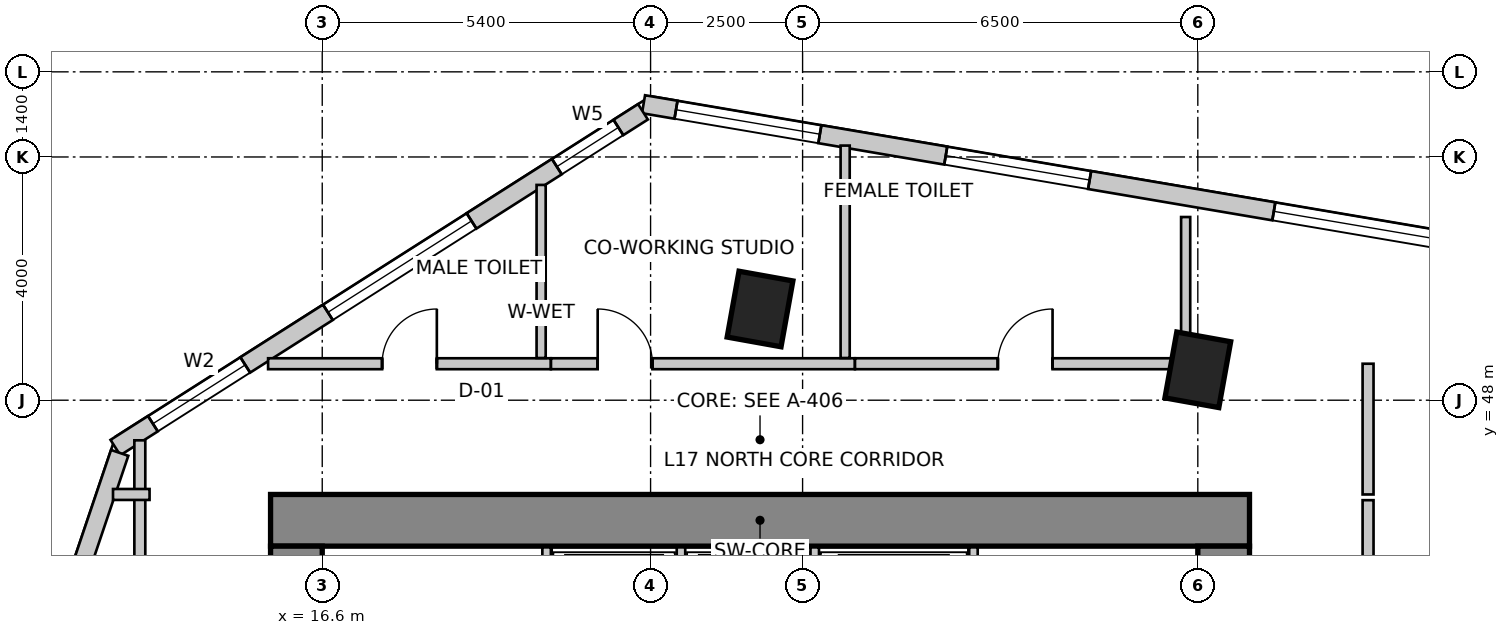
"""IFC4 building model, lengths in metres.
Left out: names, types, materials, properties, quantities, classifications, styles, units other than length and angle.
Written with IfcOpenShell. Run it as: python <this file> out.ifc"""

import sys

from ifc_helpers import new_model, si_unit, direction, frame, frame_2d, origin, origin_2d, place, context, subcontext, project, spatial, rectangle, extrude, source, transform, mapped, element, fill, save


model = new_model("IFC4")
c1 = context("Model", 3, precision=1e-05, world=origin(), true_north=direction((0.0, 1.0)))
c2 = subcontext(c1, "Body", "Model", "MODEL_VIEW")
j1 = project(units=[si_unit("LENGTHUNIT", "METRE"), si_unit("PLANEANGLEUNIT", "RADIAN")], contexts=[c1])
p1 = place(None, origin())
s1 = spatial("IfcSite", under=j1, at=p1, CompositionType="ELEMENT")
p2 = place(p1, origin())
s2 = spatial("IfcBuilding", under=s1, at=p2, CompositionType="ELEMENT")
p3 = place(p2, frame((0.0, 0.0, 71.0)))
s3 = spatial("IfcBuildingStorey", under=s2, at=p3, CompositionType="ELEMENT", Elevation=71.0)
p4 = place(p3, frame((15.75, 46.025, 0.0), z_axis=(0.0, 0.0, 1.0), x_axis=(1.0, 0.0, 0.0)))
e1 = element("IfcWall", 1, at=p4, inside=s3, PredefinedType="SHEAR", context=c2, shape_type="SweptSolid", body=[
    extrude(rectangle(XDim=16.1, YDim=0.85, at=frame_2d((8.05, 0.0))), origin(), (0.0, 0.0, 1.0), 4.0),
])
p5 = place(p3, frame((16.175, 34.2, 0.0), z_axis=(0.0, 0.0, 1.0), x_axis=(0.0, 1.0, 0.0)))
e2 = element("IfcWall", 2, at=p5, inside=s3, PredefinedType="SHEAR", context=c2, shape_type="SweptSolid", body=[
    extrude(rectangle(XDim=11.4, YDim=0.85, at=frame_2d((5.7, 0.0))), origin(), (0.0, 0.0, 1.0), 4.0),
])
m1 = source(origin(), c2, "Body", "SweptSolid", [
    extrude(rectangle(XDim=1.1, YDim=2.15, at=frame_2d((0.55, 1.075))), frame((0.0, 0.435, 0.0), z_axis=(0.0, -1.0, 0.0), x_axis=(1.0, 0.0, 0.0)), (0.0, 0.0, 1.0), 0.87),
])
p6 = place(p5, frame((7.15, 0.0, 0.0)))
e3 = element("IfcOpeningElement", 3, at=p6, cuts=e2, PredefinedType="OPENING", context=c2, shape_type="MappedRepresentation", body=[
    mapped(m1, transform((0.0, 0.0, 0.0), scale=1.0)),
])
p7 = place(p3, frame((31.425, 34.2, 0.0), z_axis=(0.0, 0.0, 1.0), x_axis=(0.0, 1.0, 0.0)))
e4 = element("IfcWall", 4, at=p7, inside=s3, PredefinedType="SHEAR", context=c2, shape_type="SweptSolid", body=[
    extrude(rectangle(XDim=11.4, YDim=0.85, at=frame_2d((5.7, 0.0))), origin(), (0.0, 0.0, 1.0), 4.0),
])
p8 = place(p7, frame((7.35, 0.0, 0.0)))
e5 = element("IfcOpeningElement", 5, at=p8, cuts=e4, PredefinedType="OPENING", context=c2, shape_type="MappedRepresentation", body=[
    mapped(m1, transform((0.0, 0.0, 0.0), scale=1.0)),
])
m2 = source(origin(), c2, "Body", "SweptSolid", [
    extrude(rectangle(XDim=0.9, YDim=1.1, at=origin_2d()), origin(), (0.0, 0.0, 1.0), 4.0),
])
for number, where, z_axis, x_axis in (
    (6, (23.8, 49.5, 0.0), (0.0, 0.0, 1.0), (0.984, -0.177, 0.0)),
    (7, (31.0, 48.5, 0.0), (0.0, 0.0, 1.0), (0.984, -0.177, 0.0)),
):
    element("IfcColumn", number, at=place(p3, frame(where, z_axis=z_axis, x_axis=x_axis)), inside=s3, PredefinedType="COLUMN", context=c2, shape_type="MappedRepresentation", body=[
        mapped(m2, transform((0.0, 0.0, 0.0), scale=1.0)),
    ])
p9 = place(p3, frame((53.961, 47.417, 0.0), z_axis=(0.0, 0.0, 1.0), x_axis=(-0.985865713455, 0.167537443678, 0.0)))
e8 = element("IfcWall", 8, at=p9, inside=s3, PredefinedType="SOLIDWALL", context=c2, shape_type="SweptSolid", body=[
    extrude(rectangle(XDim=32.537, YDim=0.3, at=frame_2d((16.269, 0.0))), origin(), (0.0, 0.0, 1.0), 3.75),
])
m3 = source(origin(), c2, "Body", "SweptSolid", [
    extrude(rectangle(XDim=2.1, YDim=2.0, at=frame_2d((1.05, 1.0))), frame((0.0, 0.16, 0.0), z_axis=(0.0, -1.0, 0.0), x_axis=(1.0, 0.0, 0.0)), (0.0, 0.0, 1.0), 0.32),
])
p10 = place(p9, frame((0.626, 0.0, 0.85)))
e9 = element("IfcOpeningElement", 9, at=p10, cuts=e8, PredefinedType="OPENING", context=c2, shape_type="MappedRepresentation", body=[
    mapped(m3, transform((0.0, 0.0, 0.0), scale=1.0)),
])
m4 = source(origin(), c2, "Body", "SweptSolid", [
    extrude(rectangle(XDim=2.4, YDim=2.2, at=frame_2d((1.2, 1.1))), frame((0.0, 0.16, 0.0), z_axis=(0.0, -1.0, 0.0), x_axis=(1.0, 0.0, 0.0)), (0.0, 0.0, 1.0), 0.32),
])
p11 = place(p9, frame((4.504, 0.0, 0.85)))
e10 = element("IfcOpeningElement", 10, at=p11, cuts=e8, PredefinedType="OPENING", context=c2, shape_type="MappedRepresentation", body=[
    mapped(m4, transform((0.0, 0.0, 0.0), scale=1.0)),
])
m5 = source(origin(), c2, "Body", "SweptSolid", [
    extrude(rectangle(XDim=2.8, YDim=2.4, at=frame_2d((1.4, 1.2))), frame((0.0, 0.16, 0.0), z_axis=(0.0, -1.0, 0.0), x_axis=(1.0, 0.0, 0.0)), (0.0, 0.0, 1.0), 0.32),
])
p12 = place(p9, frame((8.768, 0.0, 0.85)))
e11 = element("IfcOpeningElement", 11, at=p12, cuts=e8, PredefinedType="OPENING", context=c2, shape_type="MappedRepresentation", body=[
    mapped(m5, transform((0.0, 0.0, 0.0), scale=1.0)),
])
p13 = place(p9, frame((14.234, 0.0, 0.85)))
e12 = element("IfcOpeningElement", 12, at=p13, cuts=e8, PredefinedType="OPENING", context=c2, shape_type="MappedRepresentation", body=[
    mapped(m4, transform((0.0, 0.0, 0.0), scale=1.0)),
])
p14 = place(p9, frame((19.222, 0.0, 0.85)))
e13 = element("IfcOpeningElement", 13, at=p14, cuts=e8, PredefinedType="OPENING", context=c2, shape_type="MappedRepresentation", body=[
    mapped(m5, transform((0.0, 0.0, 0.0), scale=1.0)),
])
p15 = place(p9, frame((25.095, 0.0, 0.85)))
e14 = element("IfcOpeningElement", 14, at=p15, cuts=e8, PredefinedType="OPENING", context=c2, shape_type="MappedRepresentation", body=[
    mapped(m4, transform((0.0, 0.0, 0.0), scale=1.0)),
])
p16 = place(p9, frame((29.595, 0.0, 0.85)))
e15 = element("IfcOpeningElement", 15, at=p16, cuts=e8, PredefinedType="OPENING", context=c2, shape_type="MappedRepresentation", body=[
    mapped(m4, transform((0.0, 0.0, 0.0), scale=1.0)),
])
p17 = place(p3, frame((21.875, 52.742, 0.0), z_axis=(0.0, 0.0, 1.0), x_axis=(-0.843662465249, -0.536873956092, 0.0)))
e16 = element("IfcWall", 16, at=p17, inside=s3, PredefinedType="SOLIDWALL", context=c2, shape_type="SweptSolid", body=[
    extrude(rectangle(XDim=10.284, YDim=0.3, at=frame_2d((5.142, 0.0))), origin(), (0.0, 0.0, 1.0), 3.75),
])
m6 = source(origin(), c2, "Body", "SweptSolid", [
    extrude(rectangle(XDim=1.2, YDim=1.6, at=frame_2d((0.6, 0.8))), frame((0.0, 0.16, 0.0), z_axis=(0.0, -1.0, 0.0), x_axis=(1.0, 0.0, 0.0)), (0.0, 0.0, 1.0), 0.32),
])
p18 = place(p17, frame((0.479, 0.0, 0.85)))
e17 = element("IfcOpeningElement", 17, at=p18, cuts=e16, PredefinedType="OPENING", context=c2, shape_type="MappedRepresentation", body=[
    mapped(m6, transform((0.0, 0.0, 0.0), scale=1.0)),
])
p19 = place(p17, frame((3.342, 0.0, 0.85)))
e18 = element("IfcOpeningElement", 18, at=p19, cuts=e16, PredefinedType="OPENING", context=c2, shape_type="MappedRepresentation", body=[
    mapped(m5, transform((0.0, 0.0, 0.0), scale=1.0)),
])
m7 = source(origin(), c2, "Body", "SweptSolid", [
    extrude(rectangle(XDim=1.8, YDim=2.1, at=frame_2d((0.9, 1.05))), frame((0.0, 0.16, 0.0), z_axis=(0.0, -1.0, 0.0), x_axis=(1.0, 0.0, 0.0)), (0.0, 0.0, 1.0), 0.32),
])
p20 = place(p17, frame((7.753, 0.0, 0.85)))
e19 = element("IfcOpeningElement", 19, at=p20, cuts=e16, PredefinedType="OPENING", context=c2, shape_type="MappedRepresentation", body=[
    mapped(m7, transform((0.0, 0.0, 0.0), scale=1.0)),
])
p21 = place(p3, frame((13.269, 47.134, 0.0), z_axis=(0.0, 0.0, 1.0), x_axis=(-0.319920423265, -0.947444416722, 0.0)))
e20 = element("IfcWall", 20, at=p21, inside=s3, PredefinedType="SOLIDWALL", context=c2, shape_type="SweptSolid", body=[
    extrude(rectangle(XDim=16.135, YDim=0.3, at=frame_2d((8.067, 0.0))), origin(), (0.0, 0.0, 1.0), 3.75),
])
p22 = place(p21, frame((2.188, 0.0, 0.85)))
e21 = element("IfcOpeningElement", 21, at=p22, cuts=e20, PredefinedType="OPENING", context=c2, shape_type="MappedRepresentation", body=[
    mapped(m4, transform((0.0, 0.0, 0.0), scale=1.0)),
])
p23 = place(p21, frame((6.959, 0.0, 0.85)))
e22 = element("IfcOpeningElement", 22, at=p23, cuts=e20, PredefinedType="OPENING", context=c2, shape_type="MappedRepresentation", body=[
    mapped(m5, transform((0.0, 0.0, 0.0), scale=1.0)),
])
p24 = place(p21, frame((12.13, 0.0, 0.85)))
e23 = element("IfcOpeningElement", 23, at=p24, cuts=e20, PredefinedType="OPENING", context=c2, shape_type="MappedRepresentation", body=[
    mapped(m4, transform((0.0, 0.0, 0.0), scale=1.0)),
])
for number, where, z_axis, x_axis in (
    (24, (20.29, 43.28, 0.0), (0.0, 0.0, 1.0), (0.0, 1.0, 0.0)),
    (25, (27.31, 43.28, 0.0), (0.0, 0.0, 1.0), (0.0, 1.0, 0.0)),
):
    element("IfcWall", number, at=place(p3, frame(where, z_axis=z_axis, x_axis=x_axis)), inside=s3, PredefinedType="SOLIDWALL", context=c2, shape_type="SweptSolid", body=[
        extrude(rectangle(XDim=2.3, YDim=0.14, at=frame_2d((1.15, 0.0))), origin(), (0.0, 0.0, 1.0), 3.75),
    ])
for number, where, z_axis, x_axis in (
    (26, (22.5, 43.02, 0.0), (0.0, 0.0, 1.0), (0.0, 1.0, 0.0)),
    (27, (24.7, 43.02, 0.0), (0.0, 0.0, 1.0), (0.0, 1.0, 0.0)),
):
    element("IfcWall", number, at=place(p3, frame(where, z_axis=z_axis, x_axis=x_axis)), inside=s3, PredefinedType="SOLIDWALL", context=c2, shape_type="SweptSolid", body=[
        extrude(rectangle(XDim=2.56, YDim=0.14, at=frame_2d((1.28, 0.0))), origin(), (0.0, 0.0, 1.0), 3.75),
    ])
p25 = place(p3, frame((13.6, 33.444, 0.0), z_axis=(0.0, 0.0, 1.0), x_axis=(0.0, 1.0, 0.0)))
e28 = element("IfcWall", 28, at=p25, inside=s3, PredefinedType="PARTITIONING", context=c2, shape_type="SweptSolid", body=[
    extrude(rectangle(XDim=13.896, YDim=0.18, at=frame_2d((6.948, 0.0))), origin(), (0.0, 0.0, 1.0), 2.892),
])
m8 = source(origin(), c2, "Body", "SweptSolid", [
    extrude(rectangle(XDim=0.9, YDim=2.15, at=frame_2d((0.45, 1.075))), frame((0.0, 0.1, 0.0), z_axis=(0.0, -1.0, 0.0), x_axis=(1.0, 0.0, 0.0)), (0.0, 0.0, 1.0), 0.2),
])
p26 = place(p25, frame((4.144, 0.0, 0.0)))
e29 = element("IfcOpeningElement", 29, at=p26, cuts=e28, PredefinedType="OPENING", context=c2, shape_type="MappedRepresentation", body=[
    mapped(m8, transform((0.0, 0.0, 0.0), scale=1.0)),
])
p27 = place(p3, frame((13.76, 46.45, 0.0), z_axis=(0.0, 0.0, 1.0), x_axis=(-1.0, 0.0, 0.0)))
e30 = element("IfcWall", 30, at=p27, inside=s3, PredefinedType="PARTITIONING", context=c2, shape_type="SweptSolid", body=[
    extrude(rectangle(XDim=0.601, YDim=0.18, at=frame_2d((0.301, 0.0))), origin(), (0.0, 0.0, 1.0), 3.75),
])
p28 = place(p3, frame((15.71, 48.6, 0.0), z_axis=(0.0, 0.0, 1.0), x_axis=(1.0, 0.0, 0.0)))
e31 = element("IfcWall", 31, at=p28, inside=s3, PredefinedType="PARTITIONING", context=c2, shape_type="SweptSolid", body=[
    extrude(rectangle(XDim=4.65, YDim=0.18, at=frame_2d((2.325, 0.0))), origin(), (0.0, 0.0, 1.0), 3.75),
])
p29 = place(p28, frame((1.875, 0.0, 0.0)))
e32 = element("IfcOpeningElement", 32, at=p29, cuts=e31, PredefinedType="OPENING", context=c2, shape_type="MappedRepresentation", body=[
    mapped(m8, transform((0.0, 0.0, 0.0), scale=1.0)),
])
p30 = place(p3, frame((20.362, 48.6, 0.0), z_axis=(0.0, 0.0, 1.0), x_axis=(1.0, 0.0, 0.0)))
e33 = element("IfcWall", 33, at=p30, inside=s3, PredefinedType="PARTITIONING", context=c2, shape_type="SweptSolid", body=[
    extrude(rectangle(XDim=4.998, YDim=0.18, at=frame_2d((2.499, 0.0))), origin(), (0.0, 0.0, 1.0), 3.434),
])
p31 = place(p30, frame((0.768, 0.0, 0.0)))
e34 = element("IfcOpeningElement", 34, at=p31, cuts=e33, PredefinedType="OPENING", context=c2, shape_type="MappedRepresentation", body=[
    mapped(m8, transform((0.0, 0.0, 0.0), scale=1.0)),
])
p32 = place(p3, frame((25.362, 48.6, 0.0), z_axis=(0.0, 0.0, 1.0), x_axis=(1.0, 0.0, 0.0)))
e35 = element("IfcWall", 35, at=p32, inside=s3, PredefinedType="PARTITIONING", context=c2, shape_type="SweptSolid", body=[
    extrude(rectangle(XDim=5.598, YDim=0.18, at=frame_2d((2.799, 0.0))), origin(), (0.0, 0.0, 1.0), 2.892),
])
p33 = place(p32, frame((2.349, 0.0, 0.0)))
e36 = element("IfcOpeningElement", 36, at=p33, cuts=e35, PredefinedType="OPENING", context=c2, shape_type="MappedRepresentation", body=[
    mapped(m8, transform((0.0, 0.0, 0.0), scale=1.0)),
])
p34 = place(p3, frame((33.8, 48.6, 0.0), z_axis=(0.0, 0.0, 1.0), x_axis=(0.0, -1.0, 0.0)))
e37 = element("IfcWall", 37, at=p34, inside=s3, PredefinedType="PARTITIONING", context=c2, shape_type="SweptSolid", body=[
    extrude(rectangle(XDim=2.15, YDim=0.18, at=frame_2d((1.075, 0.0))), origin(), (0.0, 0.0, 1.0), 2.892),
])
p35 = place(p3, frame((33.8, 46.356, 0.0), z_axis=(0.0, 0.0, 1.0), x_axis=(0.0, -1.0, 0.0)))
e38 = element("IfcWall", 38, at=p35, inside=s3, PredefinedType="PARTITIONING", context=c2, shape_type="SweptSolid", body=[
    extrude(rectangle(XDim=3.716, YDim=0.18, at=frame_2d((1.858, 0.0))), origin(), (0.0, 0.0, 1.0), 3.322),
])
p36 = place(p3, frame((20.2, 51.54, 0.0), z_axis=(0.0, 0.0, 1.0), x_axis=(0.0, -1.0, 0.0)))
e39 = element("IfcWall", 39, at=p36, inside=s3, PredefinedType="PARTITIONING", context=c2, shape_type="SweptSolid", body=[
    extrude(rectangle(XDim=2.846, YDim=0.15, at=frame_2d((1.423, 0.0))), origin(), (0.0, 0.0, 1.0), 3.75),
])
p37 = place(p3, frame((25.2, 52.188, 0.0), z_axis=(0.0, 0.0, 1.0), x_axis=(0.0, -1.0, 0.0)))
e40 = element("IfcWall", 40, at=p37, inside=s3, PredefinedType="PARTITIONING", context=c2, shape_type="SweptSolid", body=[
    extrude(rectangle(XDim=3.493, YDim=0.15, at=frame_2d((1.747, 0.0))), origin(), (0.0, 0.0, 1.0), 2.892),
])
p38 = place(p3, frame((30.8, 51.013, 0.0), z_axis=(0.0, 0.0, 1.0), x_axis=(0.0, -1.0, 0.0)))
e41 = element("IfcWall", 41, at=p38, inside=s3, PredefinedType="PARTITIONING", context=c2, shape_type="SweptSolid", body=[
    extrude(rectangle(XDim=2.193, YDim=0.15, at=frame_2d((1.096, 0.0))), origin(), (0.0, 0.0, 1.0), 3.75),
])
m9 = source(origin(), c2, "Body", "SweptSolid", [
    extrude(rectangle(XDim=2.8, YDim=2.4, at=frame_2d((1.4, 1.2))), frame((0.0, -0.015, 0.0), z_axis=(0.0, -1.0, 0.0), x_axis=(1.0, 0.0, 0.0)), (0.0, 0.0, 1.0), 0.06),
])
p39 = place(p14, origin())
e42 = element("IfcWindow", 42, at=p39, inside=s3, PartitioningType="SINGLE_PANEL", PredefinedType="WINDOW", context=c2, shape_type="MappedRepresentation", body=[
    mapped(m9, transform((0.0, 0.0, 0.0), scale=1.0)),
])
fill(e13, e42)
m10 = source(origin(), c2, "Body", "SweptSolid", [
    extrude(rectangle(XDim=2.4, YDim=2.2, at=frame_2d((1.2, 1.1))), frame((0.0, -0.015, 0.0), z_axis=(0.0, -1.0, 0.0), x_axis=(1.0, 0.0, 0.0)), (0.0, 0.0, 1.0), 0.06),
])
p40 = place(p15, origin())
e43 = element("IfcWindow", 43, at=p40, inside=s3, PartitioningType="SINGLE_PANEL", PredefinedType="WINDOW", context=c2, shape_type="MappedRepresentation", body=[
    mapped(m10, transform((0.0, 0.0, 0.0), scale=1.0)),
])
fill(e14, e43)
p41 = place(p16, origin())
e44 = element("IfcWindow", 44, at=p41, inside=s3, PartitioningType="SINGLE_PANEL", PredefinedType="WINDOW", context=c2, shape_type="MappedRepresentation", body=[
    mapped(m10, transform((0.0, 0.0, 0.0), scale=1.0)),
])
fill(e15, e44)
m11 = source(origin(), c2, "Body", "SweptSolid", [
    extrude(rectangle(XDim=1.2, YDim=1.6, at=frame_2d((0.6, 0.8))), frame((0.0, -0.015, 0.0), z_axis=(0.0, -1.0, 0.0), x_axis=(1.0, 0.0, 0.0)), (0.0, 0.0, 1.0), 0.06),
])
p42 = place(p18, origin())
e45 = element("IfcWindow", 45, at=p42, inside=s3, PartitioningType="SINGLE_PANEL", PredefinedType="WINDOW", context=c2, shape_type="MappedRepresentation", body=[
    mapped(m11, transform((0.0, 0.0, 0.0), scale=1.0)),
])
fill(e17, e45)
p43 = place(p19, origin())
e46 = element("IfcWindow", 46, at=p43, inside=s3, PartitioningType="SINGLE_PANEL", PredefinedType="WINDOW", context=c2, shape_type="MappedRepresentation", body=[
    mapped(m9, transform((0.0, 0.0, 0.0), scale=1.0)),
])
fill(e18, e46)
m12 = source(origin(), c2, "Body", "SweptSolid", [
    extrude(rectangle(XDim=1.8, YDim=2.1, at=frame_2d((0.9, 1.05))), frame((0.0, -0.015, 0.0), z_axis=(0.0, -1.0, 0.0), x_axis=(1.0, 0.0, 0.0)), (0.0, 0.0, 1.0), 0.06),
])
p44 = place(p20, origin())
e47 = element("IfcWindow", 47, at=p44, inside=s3, PartitioningType="SINGLE_PANEL", PredefinedType="WINDOW", context=c2, shape_type="MappedRepresentation", body=[
    mapped(m12, transform((0.0, 0.0, 0.0), scale=1.0)),
])
fill(e19, e47)
m13 = source(origin(), c2, "Body", "SweptSolid", [
    extrude(rectangle(XDim=0.9, YDim=2.15, at=frame_2d((0.45, 1.075))), frame((0.0, 0.025, 0.0), z_axis=(0.0, -1.0, 0.0), x_axis=(1.0, 0.0, 0.0)), (0.0, 0.0, 1.0), 0.05),
])
p45 = place(p29, origin())
e48 = element("IfcDoor", 48, at=p45, inside=s3, OperationType="SINGLE_SWING_RIGHT", PredefinedType="DOOR", context=c2, shape_type="MappedRepresentation", body=[
    mapped(m13, transform((0.0, 0.0, 0.0), scale=1.0)),
])
fill(e32, e48)
p46 = place(p31, origin())
e49 = element("IfcDoor", 49, at=p46, inside=s3, OperationType="SINGLE_SWING_LEFT", PredefinedType="DOOR", context=c2, shape_type="MappedRepresentation", body=[
    mapped(m13, transform((0.0, 0.0, 0.0), scale=1.0)),
])
fill(e34, e49)
p47 = place(p33, origin())
e50 = element("IfcDoor", 50, at=p47, inside=s3, OperationType="SINGLE_SWING_RIGHT", PredefinedType="DOOR", context=c2, shape_type="MappedRepresentation", body=[
    mapped(m13, transform((0.0, 0.0, 0.0), scale=1.0)),
])
fill(e36, e50)
save(model, sys.argv[1])
